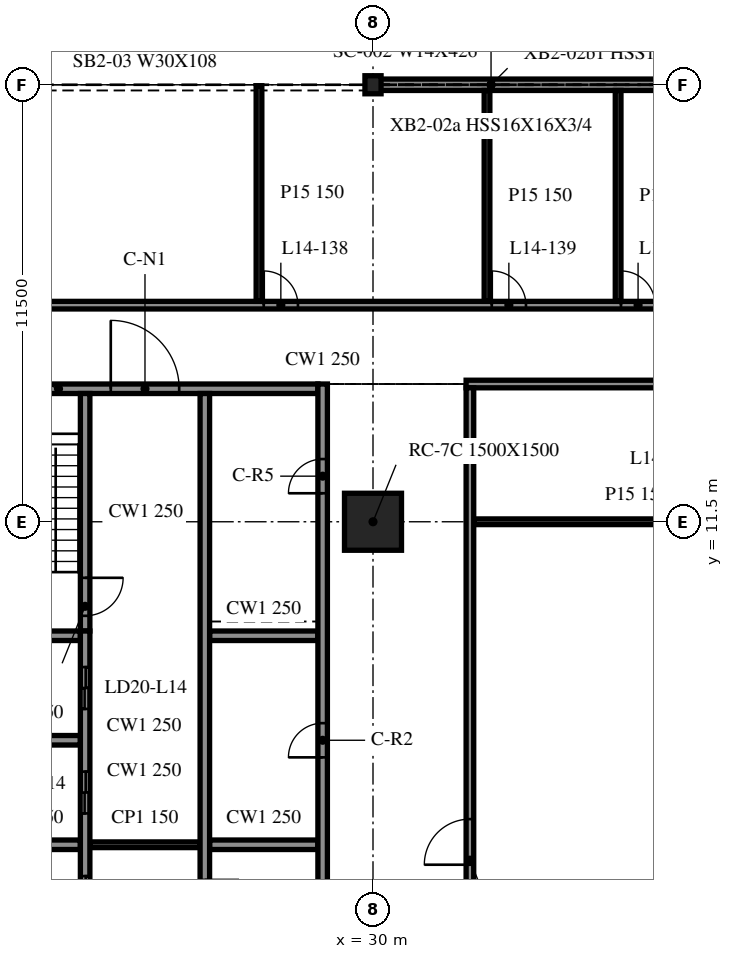
"""IFC4 building model, lengths in metres.
Left out: names, types, materials, properties, quantities, classifications, styles, units other than length and angle.
Written with IfcOpenShell. Run it as: python <this file> out.ifc"""

import sys

from ifc_helpers import new_model, si_unit, direction, frame, frame_2d, origin, origin_2d, place, context, subcontext, project, spatial, rectangle, i_section, extrude, element, fill, save


model = new_model("IFC4")
c1 = context("Model", 3, precision=1e-05, world=origin(), true_north=direction((0.0, 1.0)))
c2 = subcontext(c1, "Body", "Model", "MODEL_VIEW")
j1 = project(units=[si_unit("LENGTHUNIT", "METRE"), si_unit("PLANEANGLEUNIT", "RADIAN")], contexts=[c1])
p1 = place(None, origin())
s1 = spatial("IfcSite", under=j1, at=p1, CompositionType="ELEMENT")
p2 = place(p1, origin())
s2 = spatial("IfcBuilding", under=s1, at=p2, CompositionType="ELEMENT")
p3 = place(p2, frame((0.0, 0.0, 63.2)))
s3 = spatial("IfcBuildingStorey", under=s2, at=p3, CompositionType="ELEMENT", Elevation=63.2)
p4 = place(p3, frame((30.0, 11.5, -0.34), z_axis=(0.0, 0.0, 1.0), x_axis=(1.0, 0.0, 0.0)))
e1 = element("IfcColumn", 1, at=p4, inside=s3, PredefinedType="COLUMN", context=c2, shape_type="SweptSolid", body=[
    extrude(rectangle(XDim=1.5, YDim=1.5, at=origin_2d()), origin(), (0.0, 0.0, 1.0), 4.3),
])
p5 = place(p3, frame((30.0, 23.0, -0.34), z_axis=(0.0, 0.0, 1.0), x_axis=(1.0, 0.0, 0.0)))
e2 = element("IfcColumn", 2, at=p5, inside=s3, PredefinedType="COLUMN", context=c2, shape_type="SweptSolid", body=[
    extrude(i_section(OverallWidth=0.424, OverallDepth=0.475, WebThickness=0.048, FlangeThickness=0.077, at=origin_2d()), origin(), (0.0, 0.0, 1.0), 4.3),
])
p6 = place(p3, frame((41.976, 23.0, 0.0), z_axis=(0.0, 0.0, 1.0), x_axis=(-1.0, 0.0, 0.0)))
e3 = element("IfcWall", 3, at=p6, inside=s3, PredefinedType="NOTDEFINED", context=c2, shape_type="SweptSolid", body=[
    extrude(rectangle(XDim=11.952, YDim=0.3, at=frame_2d((5.976, 0.0))), origin(), (0.0, 0.0, 1.0), 3.203),
])
p7 = place(p3, frame((28.675, -9.125, 0.0), z_axis=(0.0, 0.0, 1.0), x_axis=(0.0, 1.0, 0.0)))
e4 = element("IfcWall", 4, at=p7, inside=s3, PredefinedType="SOLIDWALL", context=c2, shape_type="SweptSolid", body=[
    extrude(rectangle(XDim=24.25, YDim=0.25, at=frame_2d((12.125, 0.0))), origin(), (0.0, 0.0, 1.0), 3.96),
])
p8 = place(p7, frame((14.425, 0.0, 0.0)))
e5 = element("IfcOpeningElement", 5, at=p8, cuts=e4, PredefinedType="OPENING", context=c2, shape_type="SweptSolid", body=[
    extrude(rectangle(XDim=0.9, YDim=2.1, at=frame_2d((0.45, 1.05))), frame((0.0, 0.135, 0.0), z_axis=(0.0, -1.0, 0.0), x_axis=(1.0, 0.0, 0.0)), (0.0, 0.0, 1.0), 0.27),
])
p9 = place(p7, frame((21.375, 0.0, 0.0)))
e6 = element("IfcOpeningElement", 6, at=p9, cuts=e4, PredefinedType="OPENING", context=c2, shape_type="SweptSolid", body=[
    extrude(rectangle(XDim=0.9, YDim=2.1, at=frame_2d((0.45, 1.05))), frame((0.0, 0.135, 0.0), z_axis=(0.0, -1.0, 0.0), x_axis=(1.0, 0.0, 0.0)), (0.0, 0.0, 1.0), 0.27),
])
p10 = place(p3, frame((19.45, 15.0, 0.0), z_axis=(0.0, 0.0, 1.0), x_axis=(1.0, 0.0, 0.0)))
e7 = element("IfcWall", 7, at=p10, inside=s3, PredefinedType="SOLIDWALL", context=c2, shape_type="SweptSolid", body=[
    extrude(rectangle(XDim=9.1, YDim=0.25, at=frame_2d((4.55, 0.0))), origin(), (0.0, 0.0, 1.0), 3.96),
])
p11 = place(p10, frame((3.65, 0.0, 0.0)))
e8 = element("IfcOpeningElement", 8, at=p11, cuts=e7, PredefinedType="OPENING", context=c2, shape_type="SweptSolid", body=[
    extrude(rectangle(XDim=1.8, YDim=2.1, at=frame_2d((0.9, 1.05))), frame((0.0, 0.135, 0.0), z_axis=(0.0, -1.0, 0.0), x_axis=(1.0, 0.0, 0.0)), (0.0, 0.0, 1.0), 0.27),
])
p12 = place(p3, frame((22.425, -8.875, 0.0), z_axis=(0.0, 0.0, 1.0), x_axis=(0.0, 1.0, 0.0)))
e9 = element("IfcWall", 9, at=p12, inside=s3, PredefinedType="SOLIDWALL", context=c2, shape_type="SweptSolid", body=[
    extrude(rectangle(XDim=17.5, YDim=0.25, at=frame_2d((8.75, 0.0))), origin(), (0.0, 0.0, 1.0), 3.96),
])
p13 = place(p12, frame((7.2, 0.0, 0.0)))
e10 = element("IfcOpeningElement", 10, at=p13, cuts=e9, PredefinedType="OPENING", context=c2, shape_type="SweptSolid", body=[
    extrude(rectangle(XDim=1.1, YDim=2.1, at=frame_2d((0.55, 1.05))), frame((0.0, 0.135, 0.0), z_axis=(0.0, -1.0, 0.0), x_axis=(1.0, 0.0, 0.0)), (0.0, 0.0, 1.0), 0.27),
])
p14 = place(p12, frame((9.95, 0.0, 0.0)))
e11 = element("IfcOpeningElement", 11, at=p14, cuts=e9, PredefinedType="OPENING", context=c2, shape_type="SweptSolid", body=[
    extrude(rectangle(XDim=1.1, YDim=2.1, at=frame_2d((0.55, 1.05))), frame((0.0, 0.135, 0.0), z_axis=(0.0, -1.0, 0.0), x_axis=(1.0, 0.0, 0.0)), (0.0, 0.0, 1.0), 0.27),
])
p15 = place(p12, frame((12.7, 0.0, 0.0)))
e12 = element("IfcOpeningElement", 12, at=p15, cuts=e9, PredefinedType="OPENING", context=c2, shape_type="SweptSolid", body=[
    extrude(rectangle(XDim=1.1, YDim=2.1, at=frame_2d((0.55, 1.05))), frame((0.0, 0.135, 0.0), z_axis=(0.0, -1.0, 0.0), x_axis=(1.0, 0.0, 0.0)), (0.0, 0.0, 1.0), 0.27),
])
p16 = place(p12, frame((15.45, 0.0, 0.0)))
e13 = element("IfcOpeningElement", 13, at=p16, cuts=e9, PredefinedType="OPENING", context=c2, shape_type="SweptSolid", body=[
    extrude(rectangle(XDim=1.1, YDim=2.1, at=frame_2d((0.55, 1.05))), frame((0.0, 0.135, 0.0), z_axis=(0.0, -1.0, 0.0), x_axis=(1.0, 0.0, 0.0)), (0.0, 0.0, 1.0), 0.27),
])
p17 = place(p12, frame((1.012, 0.0, 0.0)))
e14 = element("IfcOpeningElement", 14, at=p17, cuts=e9, PredefinedType="OPENING", context=c2, shape_type="SweptSolid", body=[
    extrude(rectangle(XDim=0.9, YDim=2.1, at=frame_2d((0.45, 1.05))), frame((0.0, 0.135, 0.0), z_axis=(0.0, -1.0, 0.0), x_axis=(1.0, 0.0, 0.0)), (0.0, 0.0, 1.0), 0.27),
])
p18 = place(p12, frame((4.087, 0.0, 0.0)))
e15 = element("IfcOpeningElement", 15, at=p18, cuts=e9, PredefinedType="OPENING", context=c2, shape_type="SweptSolid", body=[
    extrude(rectangle(XDim=0.9, YDim=2.1, at=frame_2d((0.45, 1.05))), frame((0.0, 0.135, 0.0), z_axis=(0.0, -1.0, 0.0), x_axis=(1.0, 0.0, 0.0)), (0.0, 0.0, 1.0), 0.27),
])
p19 = place(p3, frame((22.425, 14.875, 0.0), z_axis=(0.0, 0.0, 1.0), x_axis=(0.0, -1.0, 0.0)))
e16 = element("IfcWall", 16, at=p19, inside=s3, PredefinedType="SOLIDWALL", context=c2, shape_type="SweptSolid", body=[
    extrude(rectangle(XDim=6.25, YDim=0.25, at=frame_2d((3.125, 0.0))), origin(), (0.0, 0.0, 1.0), 3.96),
])
p20 = place(p19, frame((4.85, 0.0, 0.0)))
e17 = element("IfcOpeningElement", 17, at=p20, cuts=e16, PredefinedType="OPENING", context=c2, shape_type="SweptSolid", body=[
    extrude(rectangle(XDim=1.0, YDim=2.1, at=frame_2d((0.5, 1.05))), frame((0.0, 0.135, 0.0), z_axis=(0.0, -1.0, 0.0), x_axis=(1.0, 0.0, 0.0)), (0.0, 0.0, 1.0), 0.27),
])
p21 = place(p3, frame((25.575, 14.875, 0.0), z_axis=(0.0, 0.0, 1.0), x_axis=(0.0, -1.0, 0.0)))
e18 = element("IfcWall", 18, at=p21, inside=s3, PredefinedType="SOLIDWALL", context=c2, shape_type="SweptSolid", body=[
    extrude(rectangle(XDim=17.5, YDim=0.25, at=frame_2d((8.75, 0.0))), origin(), (0.0, 0.0, 1.0), 3.96),
])
p22 = place(p21, frame((15.45, 0.0, 0.0)))
e19 = element("IfcOpeningElement", 19, at=p22, cuts=e18, PredefinedType="OPENING", context=c2, shape_type="SweptSolid", body=[
    extrude(rectangle(XDim=1.1, YDim=2.1, at=frame_2d((0.55, 1.05))), frame((0.0, 0.135, 0.0), z_axis=(0.0, -1.0, 0.0), x_axis=(1.0, 0.0, 0.0)), (0.0, 0.0, 1.0), 0.27),
])
p23 = place(p21, frame((12.8, 0.0, 0.0)))
e20 = element("IfcOpeningElement", 20, at=p23, cuts=e18, PredefinedType="OPENING", context=c2, shape_type="SweptSolid", body=[
    extrude(rectangle(XDim=0.9, YDim=2.1, at=frame_2d((0.45, 1.05))), frame((0.0, 0.135, 0.0), z_axis=(0.0, -1.0, 0.0), x_axis=(1.0, 0.0, 0.0)), (0.0, 0.0, 1.0), 0.27),
])
for number, where, z_axis, x_axis in (
    (21, (19.45, 3.0, 0.0), (0.0, 0.0, 1.0), (1.0, 0.0, 0.0)),
    (22, (19.45, 5.75, 0.0), (0.0, 0.0, 1.0), (1.0, 0.0, 0.0)),
    (23, (19.45, 8.5, 0.0), (0.0, 0.0, 1.0), (1.0, 0.0, 0.0)),
    (24, (25.7, 3.0, 0.0), (0.0, 0.0, 1.0), (1.0, 0.0, 0.0)),
    (25, (25.7, 8.5, 0.0), (0.0, 0.0, 1.0), (1.0, 0.0, 0.0)),
):
    element("IfcWall", number, at=place(p3, frame(where, z_axis=z_axis, x_axis=x_axis)), inside=s3, PredefinedType="SOLIDWALL", context=c2, shape_type="SweptSolid", body=[
        extrude(rectangle(XDim=2.85, YDim=0.25, at=frame_2d((1.425, 0.0))), origin(), (0.0, 0.0, 1.0), 3.96),
    ])
p24 = place(p3, frame((22.55, 3.0, 0.0), z_axis=(0.0, 0.0, 1.0), x_axis=(1.0, 0.0, 0.0)))
e26 = element("IfcWall", 26, at=p24, inside=s3, PredefinedType="PARTITIONING", context=c2, shape_type="SweptSolid", body=[
    extrude(rectangle(XDim=2.9, YDim=0.15, at=frame_2d((1.45, 0.0))), origin(), (0.0, 0.0, 1.0), 3.96),
])
p25 = place(p3, frame((32.65, 11.5, 0.0), z_axis=(0.0, 0.0, 1.0), x_axis=(1.0, 0.0, 0.0)))
e27 = element("IfcWall", 27, at=p25, inside=s3, PredefinedType="PARTITIONING", context=c2, shape_type="SweptSolid", body=[
    extrude(rectangle(XDim=8.6, YDim=0.15, at=frame_2d((4.3, 0.0))), origin(), (0.0, 0.0, 1.0), 3.96),
])
p26 = place(p3, frame((32.45, 15.125, 0.0), z_axis=(0.0, 0.0, 1.0), x_axis=(1.0, 0.0, 0.0)))
e28 = element("IfcWall", 28, at=p26, inside=s3, PredefinedType="PARTITIONING", context=c2, shape_type="SweptSolid", body=[
    extrude(rectangle(XDim=19.1, YDim=0.2, at=frame_2d((9.55, 0.0))), origin(), (0.0, 0.0, 1.0), 3.96),
])
p27 = place(p26, frame((5.1, 0.0, 0.0)))
e29 = element("IfcOpeningElement", 29, at=p27, cuts=e28, PredefinedType="OPENING", context=c2, shape_type="SweptSolid", body=[
    extrude(rectangle(XDim=1.2, YDim=2.1, at=frame_2d((0.6, 1.05))), frame((0.0, 0.11, 0.0), z_axis=(0.0, -1.0, 0.0), x_axis=(1.0, 0.0, 0.0)), (0.0, 0.0, 1.0), 0.22),
])
p28 = place(p26, frame((8.9, 0.0, 0.0)))
e30 = element("IfcOpeningElement", 30, at=p28, cuts=e28, PredefinedType="OPENING", context=c2, shape_type="SweptSolid", body=[
    extrude(rectangle(XDim=1.2, YDim=2.1, at=frame_2d((0.6, 1.05))), frame((0.0, 0.11, 0.0), z_axis=(0.0, -1.0, 0.0), x_axis=(1.0, 0.0, 0.0)), (0.0, 0.0, 1.0), 0.22),
])
p29 = place(p3, frame((-41.975, 17.2, 0.0), z_axis=(0.0, 0.0, 1.0), x_axis=(1.0, 0.0, 0.0)))
e31 = element("IfcWall", 31, at=p29, inside=s3, PredefinedType="PARTITIONING", context=c2, shape_type="SweptSolid", body=[
    extrude(rectangle(XDim=95.782, YDim=0.2, at=frame_2d((47.891, 0.0))), origin(), (0.0, 0.0, 1.0), 3.96),
])
p30 = place(p29, frame((13.7, 0.0, 0.0)))
e32 = element("IfcOpeningElement", 32, at=p30, cuts=e31, PredefinedType="OPENING", context=c2, shape_type="SweptSolid", body=[
    extrude(rectangle(XDim=0.9, YDim=2.1, at=frame_2d((0.45, 1.05))), frame((0.0, 0.11, 0.0), z_axis=(0.0, -1.0, 0.0), x_axis=(1.0, 0.0, 0.0)), (0.0, 0.0, 1.0), 0.22),
])
p31 = place(p29, frame((19.7, 0.0, 0.0)))
e33 = element("IfcOpeningElement", 33, at=p31, cuts=e31, PredefinedType="OPENING", context=c2, shape_type="SweptSolid", body=[
    extrude(rectangle(XDim=0.9, YDim=2.1, at=frame_2d((0.45, 1.05))), frame((0.0, 0.11, 0.0), z_axis=(0.0, -1.0, 0.0), x_axis=(1.0, 0.0, 0.0)), (0.0, 0.0, 1.0), 0.22),
])
p32 = place(p29, frame((23.1, 0.0, 0.0)))
e34 = element("IfcOpeningElement", 34, at=p32, cuts=e31, PredefinedType="OPENING", context=c2, shape_type="SweptSolid", body=[
    extrude(rectangle(XDim=0.9, YDim=2.1, at=frame_2d((0.45, 1.05))), frame((0.0, 0.11, 0.0), z_axis=(0.0, -1.0, 0.0), x_axis=(1.0, 0.0, 0.0)), (0.0, 0.0, 1.0), 0.22),
])
p33 = place(p29, frame((25.7, 0.0, 0.0)))
e35 = element("IfcOpeningElement", 35, at=p33, cuts=e31, PredefinedType="OPENING", context=c2, shape_type="SweptSolid", body=[
    extrude(rectangle(XDim=0.9, YDim=2.1, at=frame_2d((0.45, 1.05))), frame((0.0, 0.11, 0.0), z_axis=(0.0, -1.0, 0.0), x_axis=(1.0, 0.0, 0.0)), (0.0, 0.0, 1.0), 0.22),
])
p34 = place(p29, frame((40.7, 0.0, 0.0)))
e36 = element("IfcOpeningElement", 36, at=p34, cuts=e31, PredefinedType="OPENING", context=c2, shape_type="SweptSolid", body=[
    extrude(rectangle(XDim=0.9, YDim=2.1, at=frame_2d((0.45, 1.05))), frame((0.0, 0.11, 0.0), z_axis=(0.0, -1.0, 0.0), x_axis=(1.0, 0.0, 0.0)), (0.0, 0.0, 1.0), 0.22),
])
p35 = place(p29, frame((46.7, 0.0, 0.0)))
e37 = element("IfcOpeningElement", 37, at=p35, cuts=e31, PredefinedType="OPENING", context=c2, shape_type="SweptSolid", body=[
    extrude(rectangle(XDim=0.9, YDim=2.1, at=frame_2d((0.45, 1.05))), frame((0.0, 0.11, 0.0), z_axis=(0.0, -1.0, 0.0), x_axis=(1.0, 0.0, 0.0)), (0.0, 0.0, 1.0), 0.22),
])
p36 = place(p29, frame((48.1, 0.0, 0.0)))
e38 = element("IfcOpeningElement", 38, at=p36, cuts=e31, PredefinedType="OPENING", context=c2, shape_type="SweptSolid", body=[
    extrude(rectangle(XDim=0.9, YDim=2.1, at=frame_2d((0.45, 1.05))), frame((0.0, 0.11, 0.0), z_axis=(0.0, -1.0, 0.0), x_axis=(1.0, 0.0, 0.0)), (0.0, 0.0, 1.0), 0.22),
])
p37 = place(p29, frame((51.5, 0.0, 0.0)))
e39 = element("IfcOpeningElement", 39, at=p37, cuts=e31, PredefinedType="OPENING", context=c2, shape_type="SweptSolid", body=[
    extrude(rectangle(XDim=0.9, YDim=2.1, at=frame_2d((0.45, 1.05))), frame((0.0, 0.11, 0.0), z_axis=(0.0, -1.0, 0.0), x_axis=(1.0, 0.0, 0.0)), (0.0, 0.0, 1.0), 0.22),
])
p38 = place(p29, frame((54.1, 0.0, 0.0)))
e40 = element("IfcOpeningElement", 40, at=p38, cuts=e31, PredefinedType="OPENING", context=c2, shape_type="SweptSolid", body=[
    extrude(rectangle(XDim=0.9, YDim=2.1, at=frame_2d((0.45, 1.05))), frame((0.0, 0.11, 0.0), z_axis=(0.0, -1.0, 0.0), x_axis=(1.0, 0.0, 0.0)), (0.0, 0.0, 1.0), 0.22),
])
p39 = place(p29, frame((69.1, 0.0, 0.0)))
e41 = element("IfcOpeningElement", 41, at=p39, cuts=e31, PredefinedType="OPENING", context=c2, shape_type="SweptSolid", body=[
    extrude(rectangle(XDim=0.9, YDim=2.1, at=frame_2d((0.45, 1.05))), frame((0.0, 0.11, 0.0), z_axis=(0.0, -1.0, 0.0), x_axis=(1.0, 0.0, 0.0)), (0.0, 0.0, 1.0), 0.22),
])
p40 = place(p29, frame((75.1, 0.0, 0.0)))
e42 = element("IfcOpeningElement", 42, at=p40, cuts=e31, PredefinedType="OPENING", context=c2, shape_type="SweptSolid", body=[
    extrude(rectangle(XDim=0.9, YDim=2.1, at=frame_2d((0.45, 1.05))), frame((0.0, 0.11, 0.0), z_axis=(0.0, -1.0, 0.0), x_axis=(1.0, 0.0, 0.0)), (0.0, 0.0, 1.0), 0.22),
])
p41 = place(p29, frame((78.5, 0.0, 0.0)))
e43 = element("IfcOpeningElement", 43, at=p41, cuts=e31, PredefinedType="OPENING", context=c2, shape_type="SweptSolid", body=[
    extrude(rectangle(XDim=0.9, YDim=2.1, at=frame_2d((0.45, 1.05))), frame((0.0, 0.11, 0.0), z_axis=(0.0, -1.0, 0.0), x_axis=(1.0, 0.0, 0.0)), (0.0, 0.0, 1.0), 0.22),
])
p42 = place(p29, frame((81.1, 0.0, 0.0)))
e44 = element("IfcOpeningElement", 44, at=p42, cuts=e31, PredefinedType="OPENING", context=c2, shape_type="SweptSolid", body=[
    extrude(rectangle(XDim=0.9, YDim=2.1, at=frame_2d((0.45, 1.05))), frame((0.0, 0.11, 0.0), z_axis=(0.0, -1.0, 0.0), x_axis=(1.0, 0.0, 0.0)), (0.0, 0.0, 1.0), 0.22),
])
p43 = place(p3, frame((27.0, 17.3, 0.0), z_axis=(0.0, 0.0, 1.0), x_axis=(0.0, 1.0, 0.0)))
e45 = element("IfcWall", 45, at=p43, inside=s3, PredefinedType="PARTITIONING", context=c2, shape_type="SweptSolid", body=[
    extrude(rectangle(XDim=5.675, YDim=0.15, at=frame_2d((2.837, 0.0))), origin(), (0.0, 0.0, 1.0), 3.96),
])
p44 = place(p3, frame((32.55, -9.025, 0.0), z_axis=(0.0, 0.0, 1.0), x_axis=(0.0, 1.0, 0.0)))
e46 = element("IfcWall", 46, at=p44, inside=s3, PredefinedType="PARTITIONING", context=c2, shape_type="SweptSolid", body=[
    extrude(rectangle(XDim=24.05, YDim=0.2, at=frame_2d((12.025, 0.0))), origin(), (0.0, 0.0, 1.0), 3.96),
])
p45 = place(p44, frame((11.5, 0.0, 0.0)))
e47 = element("IfcOpeningElement", 47, at=p45, cuts=e46, PredefinedType="OPENING", context=c2, shape_type="SweptSolid", body=[
    extrude(rectangle(XDim=1.2, YDim=2.1, at=frame_2d((0.6, 1.05))), frame((0.0, 0.11, 0.0), z_axis=(0.0, -1.0, 0.0), x_axis=(1.0, 0.0, 0.0)), (0.0, 0.0, 1.0), 0.22),
])
for number, where, z_axis, x_axis in (
    (48, (33.0, 17.3, 0.0), (0.0, 0.0, 1.0), (0.0, 1.0, 0.0)),
    (49, (36.45, 17.3, 0.0), (0.0, 0.0, 1.0), (0.0, 1.0, 0.0)),
):
    element("IfcWall", number, at=place(p3, frame(where, z_axis=z_axis, x_axis=x_axis)), inside=s3, PredefinedType="PARTITIONING", context=c2, shape_type="SweptSolid", body=[
        extrude(rectangle(XDim=5.55, YDim=0.15, at=frame_2d((2.775, 0.0))), origin(), (0.0, 0.0, 1.0), 3.96),
    ])
p46 = place(p11, origin())
e50 = element("IfcDoor", 50, at=p46, inside=s3, OperationType="DOUBLE_DOOR_SINGLE_SWING", PredefinedType="DOOR", context=c2, shape_type="SweptSolid", body=[
    extrude(rectangle(XDim=1.8, YDim=2.1, at=frame_2d((0.9, 1.05))), frame((0.0, 0.025, 0.0), z_axis=(0.0, -1.0, 0.0), x_axis=(1.0, 0.0, 0.0)), (0.0, 0.0, 1.0), 0.05),
])
fill(e8, e50)
p47 = place(p14, origin())
e51 = element("IfcDoor", 51, at=p47, inside=s3, OperationType="DOUBLE_DOOR_SLIDING", PredefinedType="DOOR", context=c2, shape_type="SweptSolid", body=[
    extrude(rectangle(XDim=1.1, YDim=2.1, at=frame_2d((0.55, 1.05))), frame((0.0, 0.025, 0.0), z_axis=(0.0, -1.0, 0.0), x_axis=(1.0, 0.0, 0.0)), (0.0, 0.0, 1.0), 0.05),
])
fill(e11, e51)
p48 = place(p15, origin())
e52 = element("IfcDoor", 52, at=p48, inside=s3, OperationType="DOUBLE_DOOR_SLIDING", PredefinedType="DOOR", context=c2, shape_type="SweptSolid", body=[
    extrude(rectangle(XDim=1.1, YDim=2.1, at=frame_2d((0.55, 1.05))), frame((0.0, 0.025, 0.0), z_axis=(0.0, -1.0, 0.0), x_axis=(1.0, 0.0, 0.0)), (0.0, 0.0, 1.0), 0.05),
])
fill(e12, e52)
p49 = place(p16, origin())
e53 = element("IfcDoor", 53, at=p49, inside=s3, OperationType="DOUBLE_DOOR_SLIDING", PredefinedType="DOOR", context=c2, shape_type="SweptSolid", body=[
    extrude(rectangle(XDim=1.1, YDim=2.1, at=frame_2d((0.55, 1.05))), frame((0.0, 0.025, 0.0), z_axis=(0.0, -1.0, 0.0), x_axis=(1.0, 0.0, 0.0)), (0.0, 0.0, 1.0), 0.05),
])
fill(e13, e53)
p50 = place(p8, origin())
e54 = element("IfcDoor", 54, at=p50, inside=s3, OperationType="SINGLE_SWING_RIGHT", PredefinedType="DOOR", context=c2, shape_type="SweptSolid", body=[
    extrude(rectangle(XDim=0.9, YDim=2.1, at=frame_2d((0.45, 1.05))), frame((0.0, 0.025, 0.0), z_axis=(0.0, -1.0, 0.0), x_axis=(1.0, 0.0, 0.0)), (0.0, 0.0, 1.0), 0.05),
])
fill(e5, e54)
p51 = place(p9, origin())
e55 = element("IfcDoor", 55, at=p51, inside=s3, OperationType="SINGLE_SWING_LEFT", PredefinedType="DOOR", context=c2, shape_type="SweptSolid", body=[
    extrude(rectangle(XDim=0.9, YDim=2.1, at=frame_2d((0.45, 1.05))), frame((0.0, 0.025, 0.0), z_axis=(0.0, -1.0, 0.0), x_axis=(1.0, 0.0, 0.0)), (0.0, 0.0, 1.0), 0.05),
])
fill(e6, e55)
p52 = place(p20, origin())
e56 = element("IfcDoor", 56, at=p52, inside=s3, OperationType="SINGLE_SWING_RIGHT", PredefinedType="DOOR", context=c2, shape_type="SweptSolid", body=[
    extrude(rectangle(XDim=1.0, YDim=2.1, at=frame_2d((0.5, 1.05))), frame((0.0, 0.025, 0.0), z_axis=(0.0, -1.0, 0.0), x_axis=(1.0, 0.0, 0.0)), (0.0, 0.0, 1.0), 0.05),
])
fill(e17, e56)
p53 = place(p45, origin())
e57 = element("IfcDoor", 57, at=p53, inside=s3, OperationType="SINGLE_SWING_LEFT", PredefinedType="DOOR", context=c2, shape_type="SweptSolid", body=[
    extrude(rectangle(XDim=1.2, YDim=2.1, at=frame_2d((0.6, 1.05))), frame((0.0, 0.025, 0.0), z_axis=(0.0, -1.0, 0.0), x_axis=(1.0, 0.0, 0.0)), (0.0, 0.0, 1.0), 0.05),
])
fill(e47, e57)
p54 = place(p39, origin())
e58 = element("IfcDoor", 58, at=p54, inside=s3, OperationType="SINGLE_SWING_RIGHT", PredefinedType="DOOR", context=c2, shape_type="SweptSolid", body=[
    extrude(rectangle(XDim=0.9, YDim=2.1, at=frame_2d((0.45, 1.05))), frame((0.0, 0.025, 0.0), z_axis=(0.0, -1.0, 0.0), x_axis=(1.0, 0.0, 0.0)), (0.0, 0.0, 1.0), 0.05),
])
fill(e41, e58)
p55 = place(p40, origin())
e59 = element("IfcDoor", 59, at=p55, inside=s3, OperationType="SINGLE_SWING_RIGHT", PredefinedType="DOOR", context=c2, shape_type="SweptSolid", body=[
    extrude(rectangle(XDim=0.9, YDim=2.1, at=frame_2d((0.45, 1.05))), frame((0.0, 0.025, 0.0), z_axis=(0.0, -1.0, 0.0), x_axis=(1.0, 0.0, 0.0)), (0.0, 0.0, 1.0), 0.05),
])
fill(e42, e59)
p56 = place(p41, origin())
e60 = element("IfcDoor", 60, at=p56, inside=s3, OperationType="SINGLE_SWING_RIGHT", PredefinedType="DOOR", context=c2, shape_type="SweptSolid", body=[
    extrude(rectangle(XDim=0.9, YDim=2.1, at=frame_2d((0.45, 1.05))), frame((0.0, 0.025, 0.0), z_axis=(0.0, -1.0, 0.0), x_axis=(1.0, 0.0, 0.0)), (0.0, 0.0, 1.0), 0.05),
])
fill(e43, e60)
save(model, sys.argv[1])
